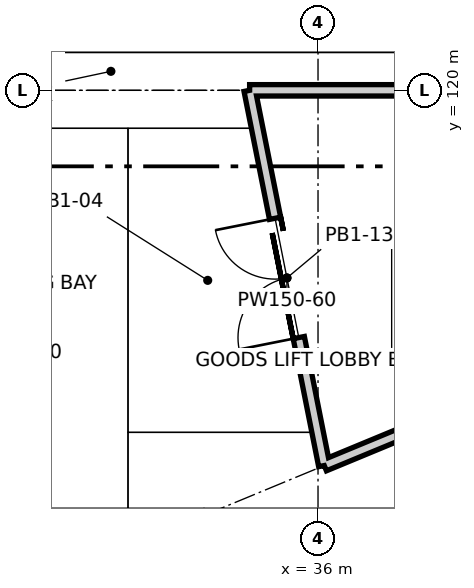
"""IFC4 building model, lengths in metres.
Left out: names, types, materials, properties, quantities, classifications, styles, units other than length and angle.
Written with IfcOpenShell. Run it as: python <this file> out.ifc"""

import sys

from ifc_helpers import new_model, si_unit, direction, frame, frame_2d, origin, place, context, subcontext, project, spatial, rectangle, extrude, element, fill, save


model = new_model("IFC4")
c1 = context("Model", 3, precision=1e-05, world=origin(), true_north=direction((0.0, 1.0)))
c2 = subcontext(c1, "Body", "Model", "MODEL_VIEW")
j1 = project(units=[si_unit("LENGTHUNIT", "METRE"), si_unit("PLANEANGLEUNIT", "RADIAN")], contexts=[c1])
p1 = place(None, origin())
s1 = spatial("IfcSite", under=j1, at=p1, CompositionType="ELEMENT")
p2 = place(p1, origin())
s2 = spatial("IfcBuilding", under=s1, at=p2, CompositionType="ELEMENT")
p3 = place(p2, frame((0.0, 0.0, -4.2)))
s3 = spatial("IfcBuildingStorey", under=s2, at=p3, CompositionType="ELEMENT", Elevation=-4.2)
p4 = place(p3, frame((38.78, 116.181, 0.0), z_axis=(0.0, 0.0, 1.0), x_axis=(-0.923881302106, -0.382679160157, 0.0)))
e1 = element("IfcWall", 1, at=p4, inside=s3, PredefinedType="PARTITIONING", context=c2, shape_type="SweptSolid", body=[
    extrude(rectangle(XDim=2.92, YDim=0.15, at=frame_2d((1.46, 0.0))), origin(), (0.0, 0.0, 1.0), 3.05),
])
p5 = place(p3, frame((36.082, 115.063, 0.0), z_axis=(0.0, 0.0, 1.0), x_axis=(-0.195089945547, 0.980785355287, 0.0)))
e2 = element("IfcWall", 2, at=p5, inside=s3, PredefinedType="PARTITIONING", context=c2, shape_type="SweptSolid", body=[
    extrude(rectangle(XDim=5.033, YDim=0.15, at=frame_2d((2.517, 0.0))), origin(), (0.0, 0.0, 1.0), 3.85),
])
p6 = place(p5, frame((1.717, 0.0, 0.0)))
e3 = element("IfcOpeningElement", 3, at=p6, cuts=e2, PredefinedType="OPENING", context=c2, shape_type="SweptSolid", body=[
    extrude(rectangle(XDim=1.6, YDim=2.1, at=frame_2d((0.8, 1.05))), frame((0.0, 0.085, 0.0), z_axis=(0.0, -1.0, 0.0), x_axis=(1.0, 0.0, 0.0)), (0.0, 0.0, 1.0), 0.17),
])
p7 = place(p3, frame((35.1, 120.0, 0.0), z_axis=(0.0, 0.0, 1.0), x_axis=(1.0, 0.0, 0.0)))
e4 = element("IfcWall", 4, at=p7, inside=s3, PredefinedType="PARTITIONING", context=c2, shape_type="SweptSolid", body=[
    extrude(rectangle(XDim=2.92, YDim=0.15, at=frame_2d((1.46, 0.0))), origin(), (0.0, 0.0, 1.0), 3.05),
])
p8 = place(p6, origin())
e5 = element("IfcDoor", 5, at=p8, inside=s3, OperationType="DOUBLE_DOOR_SINGLE_SWING", PredefinedType="DOOR", context=c2, shape_type="SweptSolid", body=[
    extrude(rectangle(XDim=1.6, YDim=2.1, at=frame_2d((0.8, 1.05))), frame((0.0, 0.025, 0.0), z_axis=(0.0, -1.0, 0.0), x_axis=(1.0, 0.0, 0.0)), (0.0, 0.0, 1.0), 0.05),
])
fill(e3, e5)
save(model, sys.argv[1])
